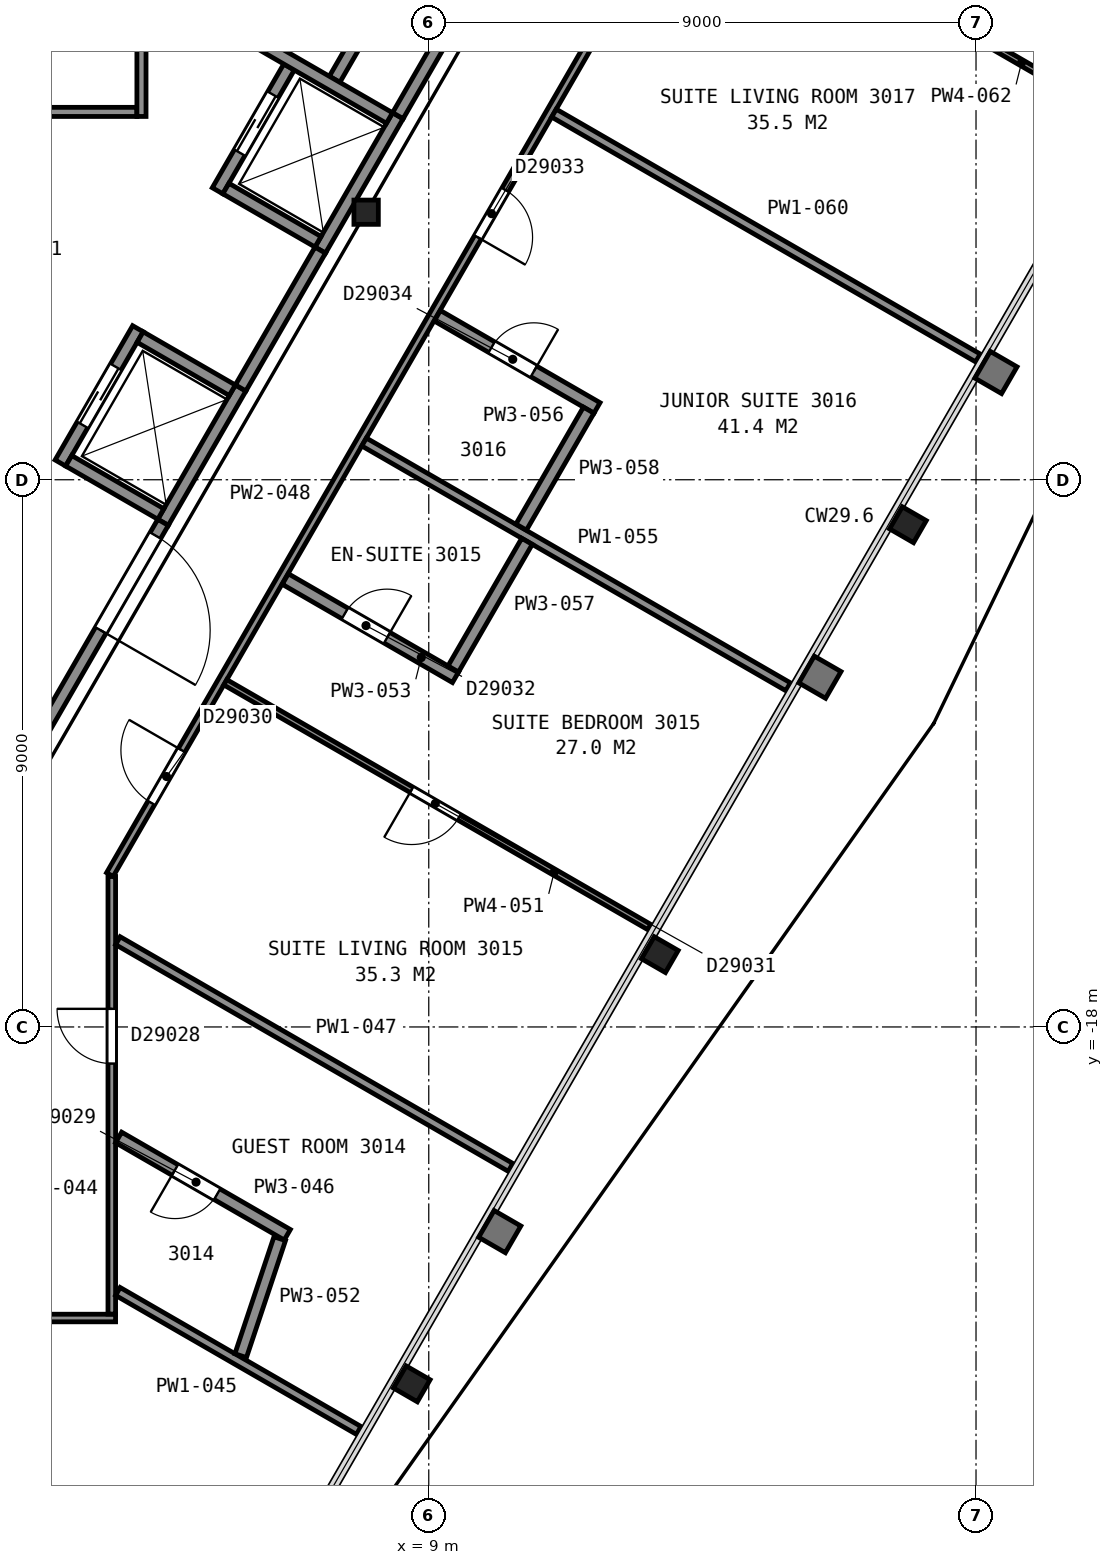
"""IFC4 building model, lengths in metres.
Left out: names, types, materials, properties, quantities, classifications, styles, units other than length and angle.
Written with IfcOpenShell. Run it as: python <this file> out.ifc"""

import sys

from ifc_helpers import new_model, si_unit, direction, frame, frame_2d, origin, origin_2d, place, context, subcontext, project, spatial, rectangle, i_section, extrude, element, fill, save


model = new_model("IFC4")
c1 = context("Model", 3, precision=1e-05, world=origin(), true_north=direction((0.0, 1.0)))
c2 = subcontext(c1, "Body", "Model", "MODEL_VIEW")
j1 = project(units=[si_unit("LENGTHUNIT", "METRE"), si_unit("PLANEANGLEUNIT", "RADIAN")], contexts=[c1])
p1 = place(None, origin())
s1 = spatial("IfcSite", under=j1, at=p1, CompositionType="ELEMENT")
p2 = place(p1, origin())
s2 = spatial("IfcBuilding", under=s1, at=p2, CompositionType="ELEMENT")
p3 = place(p2, frame((0.0, 0.0, 125.2)))
s3 = spatial("IfcBuildingStorey", under=s2, at=p3, CompositionType="ELEMENT", Elevation=125.2)
for number, where, z_axis, x_axis in (
    (1, (8.72, -23.87, 0.0), (0.0, 0.0, 1.0), (-0.5, -0.866, 0.0)),
    (2, (12.8, -16.81, 0.0), (0.0, 0.0, 1.0), (-0.5, -0.866, 0.0)),
):
    element("IfcColumn", number, at=place(p3, frame(where, z_axis=z_axis, x_axis=x_axis)), inside=s3, PredefinedType="COLUMN", context=c2, shape_type="SweptSolid", body=[
        extrude(i_section(OverallWidth=0.419, OverallDepth=0.455, WebThickness=0.042, FlangeThickness=0.068, FilletRadius=0.015, at=origin_2d()), origin(), (0.0, 0.0, 1.0), 3.56),
    ])
p4 = place(p3, frame((16.88, -9.74, 0.0), z_axis=(0.0, 0.0, 1.0), x_axis=(-0.5, -0.866025403784, 0.0)))
e3 = element("IfcColumn", 3, at=p4, inside=s3, PredefinedType="COLUMN", context=c2, shape_type="SweptSolid", body=[
    extrude(i_section(OverallWidth=0.419, OverallDepth=0.455, WebThickness=0.042, FlangeThickness=0.068, FilletRadius=0.015, at=origin_2d()), origin(), (0.0, 0.0, 1.0), 3.565),
])
p5 = place(p3, frame((7.97, -4.6, 0.0), z_axis=(0.0, 0.0, 1.0), x_axis=(1.0, 0.0, 0.0)))
e4 = element("IfcColumn", 4, at=p5, inside=s3, PredefinedType="COLUMN", context=c2, shape_type="SweptSolid", body=[
    extrude(i_section(OverallWidth=0.401, OverallDepth=0.399, WebThickness=0.025, FlangeThickness=0.04, FilletRadius=0.015, at=origin_2d()), origin(), (0.0, 0.0, 1.0), 3.6),
])
p6 = place(p3, frame((4.63, -9.7, 0.0), z_axis=(0.0, 0.0, 1.0), x_axis=(0.500062241894, 0.865989465428, 0.0)))
e5 = element("IfcWall", 5, at=p6, inside=s3, PredefinedType="PARTITIONING", context=c2, shape_type="SweptSolid", body=[
    extrude(rectangle(XDim=2.55, YDim=0.2, at=frame_2d((1.275, 0.0))), origin(), (0.0, 0.0, 1.0), 3.6),
])
p7 = place(p3, frame((7.216, -5.222, 0.0), z_axis=(0.0, 0.0, 1.0), x_axis=(0.499990435942, 0.866030925526, 0.0)))
e6 = element("IfcWall", 6, at=p7, inside=s3, PredefinedType="PARTITIONING", context=c2, shape_type="SweptSolid", body=[
    extrude(rectangle(XDim=2.55, YDim=0.2, at=frame_2d((1.275, 0.0))), origin(), (0.0, 0.0, 1.0), 3.6),
])
p8 = place(p3, frame((7.451, -2.414, 0.0), z_axis=(0.0, 0.0, 1.0), x_axis=(0.500016218704, 0.866016039709, 0.0)))
e7 = element("IfcWall", 7, at=p8, inside=s3, PredefinedType="PARTITIONING", context=c2, shape_type="SweptSolid", body=[
    extrude(rectangle(XDim=4.7, YDim=0.2, at=frame_2d((2.35, 0.0))), origin(), (0.0, 0.0, 1.0), 3.6),
])
p9 = place(p3, frame((2.942, -8.725, 0.0), z_axis=(0.0, 0.0, 1.0), x_axis=(0.500020783669, 0.866013403995, 0.0)))
e8 = element("IfcWall", 8, at=p9, inside=s3, PredefinedType="PARTITIONING", context=c2, shape_type="SweptSolid", body=[
    extrude(rectangle(XDim=2.55, YDim=0.2, at=frame_2d((1.275, 0.0))), origin(), (0.0, 0.0, 1.0), 3.6),
])
p10 = place(p9, frame((0.725, 0.0, 0.0)))
e9 = element("IfcOpeningElement", 9, at=p10, cuts=e8, PredefinedType="OPENING", context=c2, shape_type="SweptSolid", body=[
    extrude(rectangle(XDim=1.1, YDim=2.1, at=frame_2d((0.55, 1.05))), frame((0.0, 0.11, 0.0), z_axis=(0.0, -1.0, 0.0), x_axis=(1.0, 0.0, 0.0)), (0.0, 0.0, 1.0), 0.22),
])
p11 = place(p3, frame((5.527, -4.247, 0.0), z_axis=(0.0, 0.0, 1.0), x_axis=(0.499938297808, 0.866061024631, 0.0)))
e10 = element("IfcWall", 10, at=p11, inside=s3, PredefinedType="PARTITIONING", context=c2, shape_type="SweptSolid", body=[
    extrude(rectangle(XDim=2.35, YDim=0.2, at=frame_2d((1.175, 0.0))), origin(), (0.0, 0.0, 1.0), 3.6),
])
p12 = place(p11, frame((0.725, 0.0, 0.0)))
e11 = element("IfcOpeningElement", 11, at=p12, cuts=e10, PredefinedType="OPENING", context=c2, shape_type="SweptSolid", body=[
    extrude(rectangle(XDim=1.1, YDim=2.1, at=frame_2d((0.55, 1.05))), frame((0.0, 0.11, 0.0), z_axis=(0.0, -1.0, 0.0), x_axis=(1.0, 0.0, 0.0)), (0.0, 0.0, 1.0), 0.22),
])
p13 = place(p3, frame((8.354, -3.051, 0.0), z_axis=(0.0, 0.0, 1.0), x_axis=(-0.866060182126, 0.499939757307, 0.0)))
e12 = element("IfcWall", 12, at=p13, inside=s3, PredefinedType="PARTITIONING", context=c2, shape_type="SweptSolid", body=[
    extrude(rectangle(XDim=2.95, YDim=0.2, at=frame_2d((1.475, 0.0))), origin(), (0.0, 0.0, 1.0), 3.6),
])
p14 = place(p3, frame((7.179, -5.086, 0.0), z_axis=(0.0, 0.0, 1.0), x_axis=(-0.866036909293, 0.499980071345, 0.0)))
e13 = element("IfcWall", 13, at=p14, inside=s3, PredefinedType="PARTITIONING", context=c2, shape_type="SweptSolid", body=[
    extrude(rectangle(XDim=1.75, YDim=0.2, at=frame_2d((0.875, 0.0))), origin(), (0.0, 0.0, 1.0), 3.6),
])
p15 = place(p3, frame((5.769, -7.528, 0.0), z_axis=(0.0, 0.0, 1.0), x_axis=(-0.866002029911, 0.500040482552, 0.0)))
e14 = element("IfcWall", 14, at=p15, inside=s3, PredefinedType="PARTITIONING", context=c2, shape_type="SweptSolid", body=[
    extrude(rectangle(XDim=1.75, YDim=0.2, at=frame_2d((0.875, 0.0))), origin(), (0.0, 0.0, 1.0), 3.6),
])
p16 = place(p3, frame((4.594, -9.563, 0.0), z_axis=(0.0, 0.0, 1.0), x_axis=(-0.866036909293, 0.499980071345, 0.0)))
e15 = element("IfcWall", 15, at=p16, inside=s3, PredefinedType="PARTITIONING", context=c2, shape_type="SweptSolid", body=[
    extrude(rectangle(XDim=1.75, YDim=0.2, at=frame_2d((0.875, 0.0))), origin(), (0.0, 0.0, 1.0), 3.6),
])
p17 = place(p3, frame((1.677, -14.815, 0.0), z_axis=(0.0, 0.0, 1.0), x_axis=(0.49999445743, 0.866028603765, 0.0)))
e16 = element("IfcWall", 16, at=p17, inside=s3, PredefinedType="PARTITIONING", context=c2, shape_type="SweptSolid", body=[
    extrude(rectangle(XDim=5.905, YDim=0.2, at=frame_2d((2.952, 0.0))), origin(), (0.0, 0.0, 1.0), 3.35),
])
p18 = place(p17, frame((3.855, 0.0, 0.0)))
e17 = element("IfcOpeningElement", 17, at=p18, cuts=e16, PredefinedType="OPENING", context=c2, shape_type="SweptSolid", body=[
    extrude(rectangle(XDim=1.8, YDim=2.1, at=frame_2d((0.9, 1.05))), frame((0.0, 0.11, 0.0), z_axis=(0.0, -1.0, 0.0), x_axis=(1.0, 0.0, 0.0)), (0.0, 0.0, 1.0), 0.22),
])
p19 = place(p3, frame((1.8, -2.95, 0.0), z_axis=(0.0, 0.0, 1.0), x_axis=(1.0, 0.0, 0.0)))
e18 = element("IfcWall", 18, at=p19, inside=s3, PredefinedType="PARTITIONING", context=c2, shape_type="SweptSolid", body=[
    extrude(rectangle(XDim=2.4, YDim=0.15, at=frame_2d((1.2, 0.0))), origin(), (0.0, 0.0, 1.0), 3.35),
])
p20 = place(p3, frame((4.275, -3.025, 0.0), z_axis=(0.0, 0.0, 1.0), x_axis=(0.0, 1.0, 0.0)))
e19 = element("IfcWall", 19, at=p20, inside=s3, PredefinedType="PARTITIONING", context=c2, shape_type="SweptSolid", body=[
    extrude(rectangle(XDim=2.923, YDim=0.15, at=frame_2d((1.461, 0.0))), origin(), (0.0, 0.0, 1.0), 3.35),
])
p21 = place(p3, frame((5.906, -7.49, 0.0), z_axis=(0.0, 0.0, 1.0), x_axis=(0.500252727967, 0.865879442048, 0.0)))
e20 = element("IfcWall", 20, at=p21, inside=s3, PredefinedType="PARTITIONING", context=c2, shape_type="SweptSolid", body=[
    extrude(rectangle(XDim=2.617, YDim=0.2, at=frame_2d((1.309, 0.0))), origin(), (0.0, 0.0, 1.0), 3.35),
])
p22 = place(p3, frame((8.492, -3.012, 0.0), z_axis=(0.0, 0.0, 1.0), x_axis=(0.499972957231, 0.866041016371, 0.0)))
e21 = element("IfcWall", 21, at=p22, inside=s3, PredefinedType="PARTITIONING", context=c2, shape_type="SweptSolid", body=[
    extrude(rectangle(XDim=10.349, YDim=0.2, at=frame_2d((5.174, 0.0))), origin(), (0.0, 0.0, 1.0), 3.35),
])
p23 = place(p3, frame((3.85, -22.787, 0.0), z_axis=(0.0, 0.0, 1.0), x_axis=(-1.0, 0.0, 0.0)))
e22 = element("IfcWall", 22, at=p23, inside=s3, PredefinedType="PARTITIONING", context=c2, shape_type="SweptSolid", body=[
    extrude(rectangle(XDim=7.699, YDim=0.125, at=frame_2d((3.85, 0.0))), origin(), (0.0, 0.0, 1.0), 2.613),
])
p24 = place(p23, frame((3.086, 0.0, 0.0)))
e23 = element("IfcOpeningElement", 23, at=p24, cuts=e22, PredefinedType="OPENING", context=c2, shape_type="SweptSolid", body=[
    extrude(rectangle(XDim=1.5, YDim=2.1, at=frame_2d((0.75, 1.05))), frame((0.0, 0.073, 0.0), z_axis=(0.0, -1.0, 0.0), x_axis=(1.0, 0.0, 0.0)), (0.0, 0.0, 1.0), 0.145),
])
p25 = place(p3, frame((3.787, -15.525, 0.0), z_axis=(0.0, 0.0, 1.0), x_axis=(0.0, -1.0, 0.0)))
e24 = element("IfcWall", 24, at=p25, inside=s3, PredefinedType="PARTITIONING", context=c2, shape_type="SweptSolid", body=[
    extrude(rectangle(XDim=7.197, YDim=0.125, at=frame_2d((3.599, 0.0))), origin(), (0.0, 0.0, 1.0), 2.613),
])
p26 = place(p25, frame((2.177, 0.0, 0.0)))
e25 = element("IfcOpeningElement", 25, at=p26, cuts=e24, PredefinedType="OPENING", context=c2, shape_type="SweptSolid", body=[
    extrude(rectangle(XDim=0.9, YDim=2.1, at=frame_2d((0.45, 1.05))), frame((0.0, 0.073, 0.0), z_axis=(0.0, -1.0, 0.0), x_axis=(1.0, 0.0, 0.0)), (0.0, 0.0, 1.0), 0.145),
])
p27 = place(p3, frame((3.887, -22.35, 0.0), z_axis=(0.0, 0.0, 1.0), x_axis=(0.866046917185, -0.499962735845, 0.0)))
e26 = element("IfcWall", 26, at=p27, inside=s3, PredefinedType="PARTITIONING", context=c2, shape_type="SweptSolid", body=[
    extrude(rectangle(XDim=4.573, YDim=0.15, at=frame_2d((2.287, 0.0))), origin(), (0.0, 0.0, 1.0), 2.613),
])
p28 = place(p3, frame((6.674, -21.418, 0.0), z_axis=(0.0, 0.0, 1.0), x_axis=(-0.866105631149, 0.499861016376, 0.0)))
e27 = element("IfcWall", 27, at=p28, inside=s3, PredefinedType="PARTITIONING", context=c2, shape_type="SweptSolid", body=[
    extrude(rectangle(XDim=3.203, YDim=0.2, at=frame_2d((1.602, 0.0))), origin(), (0.0, 0.0, 1.0), 2.613),
])
p29 = place(p28, frame((1.333, 0.0, 0.0)))
e28 = element("IfcOpeningElement", 28, at=p29, cuts=e27, PredefinedType="OPENING", context=c2, shape_type="SweptSolid", body=[
    extrude(rectangle(XDim=0.8, YDim=2.1, at=frame_2d((0.4, 1.05))), frame((0.0, 0.11, 0.0), z_axis=(0.0, -1.0, 0.0), x_axis=(1.0, 0.0, 0.0)), (0.0, 0.0, 1.0), 0.22),
])
p30 = place(p3, frame((3.887, -16.581, 0.0), z_axis=(0.0, 0.0, 1.0), x_axis=(0.866008413041, -0.500029427677, 0.0)))
e29 = element("IfcWall", 29, at=p30, inside=s3, PredefinedType="PARTITIONING", context=c2, shape_type="SweptSolid", body=[
    extrude(rectangle(XDim=7.458, YDim=0.15, at=frame_2d((3.729, 0.0))), origin(), (0.0, 0.0, 1.0), 2.613),
])
p31 = place(p3, frame((15.684, 5.165, 0.0), z_axis=(0.0, 0.0, 1.0), x_axis=(-0.500027787016, -0.866009360349, 0.0)))
e30 = element("IfcWall", 30, at=p31, inside=s3, PredefinedType="PARTITIONING", context=c2, shape_type="SweptSolid", body=[
    extrude(rectangle(XDim=23.856, YDim=0.125, at=frame_2d((11.928, 0.0))), origin(), (0.0, 0.0, 1.0), 2.613),
])
p32 = place(p31, frame((21.493, 0.0, 0.0)))
e31 = element("IfcOpeningElement", 31, at=p32, cuts=e30, PredefinedType="OPENING", context=c2, shape_type="SweptSolid", body=[
    extrude(rectangle(XDim=1.0, YDim=2.1, at=frame_2d((0.5, 1.05))), frame((0.0, 0.073, 0.0), z_axis=(0.0, -1.0, 0.0), x_axis=(1.0, 0.0, 0.0)), (0.0, 0.0, 1.0), 0.145),
])
p33 = place(p31, frame((10.853, 0.0, 0.0)))
e32 = element("IfcOpeningElement", 32, at=p33, cuts=e30, PredefinedType="OPENING", context=c2, shape_type="SweptSolid", body=[
    extrude(rectangle(XDim=0.9, YDim=2.1, at=frame_2d((0.45, 1.05))), frame((0.0, 0.073, 0.0), z_axis=(0.0, -1.0, 0.0), x_axis=(1.0, 0.0, 0.0)), (0.0, 0.0, 1.0), 0.145),
])
p34 = place(p31, frame((6.558, 0.0, 0.0)))
e33 = element("IfcOpeningElement", 33, at=p34, cuts=e30, PredefinedType="OPENING", context=c2, shape_type="SweptSolid", body=[
    extrude(rectangle(XDim=1.0, YDim=2.1, at=frame_2d((0.5, 1.05))), frame((0.0, 0.073, 0.0), z_axis=(0.0, -1.0, 0.0), x_axis=(1.0, 0.0, 0.0)), (0.0, 0.0, 1.0), 0.145),
])
p35 = place(p3, frame((5.654, -12.331, 0.0), z_axis=(0.0, 0.0, 1.0), x_axis=(0.866051796338, -0.49995428397, 0.0)))
e34 = element("IfcWall", 34, at=p35, inside=s3, PredefinedType="PARTITIONING", context=c2, shape_type="SweptSolid", body=[
    extrude(rectangle(XDim=8.052, YDim=0.1, at=frame_2d((4.026, 0.0))), origin(), (0.0, 0.0, 1.0), 2.613),
])
p36 = place(p35, frame((3.538, 0.0, 0.0)))
e35 = element("IfcOpeningElement", 35, at=p36, cuts=e34, PredefinedType="OPENING", context=c2, shape_type="SweptSolid", body=[
    extrude(rectangle(XDim=0.9, YDim=2.1, at=frame_2d((0.45, 1.05))), frame((0.0, 0.06, 0.0), z_axis=(0.0, -1.0, 0.0), x_axis=(1.0, 0.0, 0.0)), (0.0, 0.0, 1.0), 0.12),
])
p37 = place(p3, frame((5.907, -23.406, 0.0), z_axis=(0.0, 0.0, 1.0), x_axis=(0.316661020634, 0.948538769904, 0.0)))
e36 = element("IfcWall", 36, at=p37, inside=s3, PredefinedType="PARTITIONING", context=c2, shape_type="SweptSolid", body=[
    extrude(rectangle(XDim=2.029, YDim=0.2, at=frame_2d((1.014, 0.0))), origin(), (0.0, 0.0, 1.0), 2.613),
])
p38 = place(p3, frame((6.64, -10.633, 0.0), z_axis=(0.0, 0.0, 1.0), x_axis=(0.866022073929, -0.500005767435, 0.0)))
e37 = element("IfcWall", 37, at=p38, inside=s3, PredefinedType="PARTITIONING", context=c2, shape_type="SweptSolid", body=[
    extrude(rectangle(XDim=3.232, YDim=0.2, at=frame_2d((1.616, 0.0))), origin(), (0.0, 0.0, 1.0), 2.613),
])
p39 = place(p38, frame((1.133, 0.0, 0.0)))
e38 = element("IfcOpeningElement", 38, at=p39, cuts=e37, PredefinedType="OPENING", context=c2, shape_type="SweptSolid", body=[
    extrude(rectangle(XDim=0.8, YDim=2.1, at=frame_2d((0.4, 1.05))), frame((0.0, 0.11, 0.0), z_axis=(0.0, -1.0, 0.0), x_axis=(1.0, 0.0, 0.0)), (0.0, 0.0, 1.0), 0.22),
])
p40 = place(p3, frame((7.936, -8.379, 0.0), z_axis=(0.0, 0.0, 1.0), x_axis=(0.866044217767, -0.499967411811, 0.0)))
e39 = element("IfcWall", 39, at=p40, inside=s3, PredefinedType="PARTITIONING", context=c2, shape_type="SweptSolid", body=[
    extrude(rectangle(XDim=8.052, YDim=0.15, at=frame_2d((4.026, 0.0))), origin(), (0.0, 0.0, 1.0), 2.613),
])
p41 = place(p3, frame((11.767, -7.819, 0.0), z_axis=(0.0, 0.0, 1.0), x_axis=(-0.866009954834, 0.500026757412, 0.0)))
e40 = element("IfcWall", 40, at=p41, inside=s3, PredefinedType="PARTITIONING", context=c2, shape_type="SweptSolid", body=[
    extrude(rectangle(XDim=3.032, YDim=0.2, at=frame_2d((1.516, 0.0))), origin(), (0.0, 0.0, 1.0), 2.613),
])
p42 = place(p41, frame((1.2, 0.0, 0.0)))
e41 = element("IfcOpeningElement", 41, at=p42, cuts=e40, PredefinedType="OPENING", context=c2, shape_type="SweptSolid", body=[
    extrude(rectangle(XDim=0.8, YDim=2.1, at=frame_2d((0.4, 1.05))), frame((0.0, 0.11, 0.0), z_axis=(0.0, -1.0, 0.0), x_axis=(1.0, 0.0, 0.0)), (0.0, 0.0, 1.0), 0.22),
])
p43 = place(p3, frame((9.403, -12.112, 0.0), z_axis=(0.0, 0.0, 1.0), x_axis=(0.500103096288, 0.865965872932, 0.0)))
e42 = element("IfcWall", 42, at=p43, inside=s3, PredefinedType="PARTITIONING", context=c2, shape_type="SweptSolid", body=[
    extrude(rectangle(XDim=2.424, YDim=0.2, at=frame_2d((1.212, 0.0))), origin(), (0.0, 0.0, 1.0), 2.613),
])
p44 = place(p3, frame((10.52, -9.779, 0.0), z_axis=(0.0, 0.0, 1.0), x_axis=(0.499935013329, 0.866062920605, 0.0)))
e43 = element("IfcWall", 43, at=p44, inside=s3, PredefinedType="PARTITIONING", context=c2, shape_type="SweptSolid", body=[
    extrude(rectangle(XDim=2.22, YDim=0.2, at=frame_2d((1.11, 0.0))), origin(), (0.0, 0.0, 1.0), 2.613),
])
p45 = place(p3, frame((11.059, -2.97, 0.0), z_axis=(0.0, 0.0, 1.0), x_axis=(0.865968957472, -0.500097755139, 0.0)))
e44 = element("IfcWall", 44, at=p45, inside=s3, PredefinedType="PARTITIONING", context=c2, shape_type="SweptSolid", body=[
    extrude(rectangle(XDim=8.052, YDim=0.15, at=frame_2d((4.026, 0.0))), origin(), (0.0, 0.0, 1.0), 2.613),
])
p46 = place(p3, frame((13.341, 0.982, 0.0), z_axis=(0.0, 0.0, 1.0), x_axis=(0.865974505336, -0.500088148337, 0.0)))
e45 = element("IfcWall", 45, at=p46, inside=s3, PredefinedType="PARTITIONING", context=c2, shape_type="SweptSolid", body=[
    extrude(rectangle(XDim=8.052, YDim=0.1, at=frame_2d((4.026, 0.0))), origin(), (0.0, 0.0, 1.0), 2.613),
])
p47 = place(p46, frame((3.538, 0.0, 0.0)))
e46 = element("IfcOpeningElement", 46, at=p47, cuts=e45, PredefinedType="OPENING", context=c2, shape_type="SweptSolid", body=[
    extrude(rectangle(XDim=0.9, YDim=2.1, at=frame_2d((0.45, 1.05))), frame((0.0, 0.06, 0.0), z_axis=(0.0, -1.0, 0.0), x_axis=(1.0, 0.0, 0.0)), (0.0, 0.0, 1.0), 0.12),
])
p48 = place(p10, origin())
e47 = element("IfcDoor", 47, at=p48, inside=s3, OperationType="SLIDING_TO_RIGHT", PredefinedType="DOOR", context=c2, shape_type="SweptSolid", body=[
    extrude(rectangle(XDim=1.1, YDim=2.1, at=frame_2d((0.55, 1.05))), frame((0.0, 0.025, 0.0), z_axis=(0.0, -1.0, 0.0), x_axis=(1.0, 0.0, 0.0)), (0.0, 0.0, 1.0), 0.05),
])
fill(e9, e47)
p49 = place(p12, origin())
e48 = element("IfcDoor", 48, at=p49, inside=s3, OperationType="SLIDING_TO_LEFT", PredefinedType="DOOR", context=c2, shape_type="SweptSolid", body=[
    extrude(rectangle(XDim=1.1, YDim=2.1, at=frame_2d((0.55, 1.05))), frame((0.0, 0.025, 0.0), z_axis=(0.0, -1.0, 0.0), x_axis=(1.0, 0.0, 0.0)), (0.0, 0.0, 1.0), 0.05),
])
fill(e11, e48)
p50 = place(p18, origin())
e49 = element("IfcDoor", 49, at=p50, inside=s3, OperationType="DOUBLE_DOOR_SINGLE_SWING", PredefinedType="DOOR", context=c2, shape_type="SweptSolid", body=[
    extrude(rectangle(XDim=1.8, YDim=2.1, at=frame_2d((0.9, 1.05))), frame((0.0, 0.025, 0.0), z_axis=(0.0, -1.0, 0.0), x_axis=(1.0, 0.0, 0.0)), (0.0, 0.0, 1.0), 0.05),
])
fill(e17, e49)
p51 = place(p26, origin())
e50 = element("IfcDoor", 50, at=p51, inside=s3, OperationType="SINGLE_SWING_LEFT", PredefinedType="DOOR", context=c2, shape_type="SweptSolid", body=[
    extrude(rectangle(XDim=0.9, YDim=2.1, at=frame_2d((0.45, 1.05))), frame((0.0, 0.025, 0.0), z_axis=(0.0, -1.0, 0.0), x_axis=(1.0, 0.0, 0.0)), (0.0, 0.0, 1.0), 0.05),
])
fill(e25, e50)
p52 = place(p29, origin())
e51 = element("IfcDoor", 51, at=p52, inside=s3, OperationType="SINGLE_SWING_RIGHT", PredefinedType="DOOR", context=c2, shape_type="SweptSolid", body=[
    extrude(rectangle(XDim=0.8, YDim=2.1, at=frame_2d((0.4, 1.05))), frame((0.0, 0.025, 0.0), z_axis=(0.0, -1.0, 0.0), x_axis=(1.0, 0.0, 0.0)), (0.0, 0.0, 1.0), 0.05),
])
fill(e28, e51)
p53 = place(p32, origin())
e52 = element("IfcDoor", 52, at=p53, inside=s3, OperationType="SINGLE_SWING_LEFT", PredefinedType="DOOR", context=c2, shape_type="SweptSolid", body=[
    extrude(rectangle(XDim=1.0, YDim=2.1, at=frame_2d((0.5, 1.05))), frame((0.0, 0.025, 0.0), z_axis=(0.0, -1.0, 0.0), x_axis=(1.0, 0.0, 0.0)), (0.0, 0.0, 1.0), 0.05),
])
fill(e31, e52)
p54 = place(p33, origin())
e53 = element("IfcDoor", 53, at=p54, inside=s3, OperationType="SINGLE_SWING_RIGHT", PredefinedType="DOOR", context=c2, shape_type="SweptSolid", body=[
    extrude(rectangle(XDim=0.9, YDim=2.1, at=frame_2d((0.45, 1.05))), frame((0.0, 0.025, 0.0), z_axis=(0.0, -1.0, 0.0), x_axis=(1.0, 0.0, 0.0)), (0.0, 0.0, 1.0), 0.05),
])
fill(e32, e53)
p55 = place(p36, origin())
e54 = element("IfcDoor", 54, at=p55, inside=s3, OperationType="SINGLE_SWING_LEFT", PredefinedType="DOOR", context=c2, shape_type="SweptSolid", body=[
    extrude(rectangle(XDim=0.9, YDim=2.1, at=frame_2d((0.45, 1.05))), frame((0.0, 0.025, 0.0), z_axis=(0.0, -1.0, 0.0), x_axis=(1.0, 0.0, 0.0)), (0.0, 0.0, 1.0), 0.05),
])
fill(e35, e54)
p56 = place(p39, origin())
e55 = element("IfcDoor", 55, at=p56, inside=s3, OperationType="SINGLE_SWING_RIGHT", PredefinedType="DOOR", context=c2, shape_type="SweptSolid", body=[
    extrude(rectangle(XDim=0.8, YDim=2.1, at=frame_2d((0.4, 1.05))), frame((0.0, 0.025, 0.0), z_axis=(0.0, -1.0, 0.0), x_axis=(1.0, 0.0, 0.0)), (0.0, 0.0, 1.0), 0.05),
])
fill(e38, e55)
p57 = place(p42, origin())
e56 = element("IfcDoor", 56, at=p57, inside=s3, OperationType="SINGLE_SWING_LEFT", PredefinedType="DOOR", context=c2, shape_type="SweptSolid", body=[
    extrude(rectangle(XDim=0.8, YDim=2.1, at=frame_2d((0.4, 1.05))), frame((0.0, 0.025, 0.0), z_axis=(0.0, -1.0, 0.0), x_axis=(1.0, 0.0, 0.0)), (0.0, 0.0, 1.0), 0.05),
])
fill(e41, e56)
save(model, sys.argv[1])
